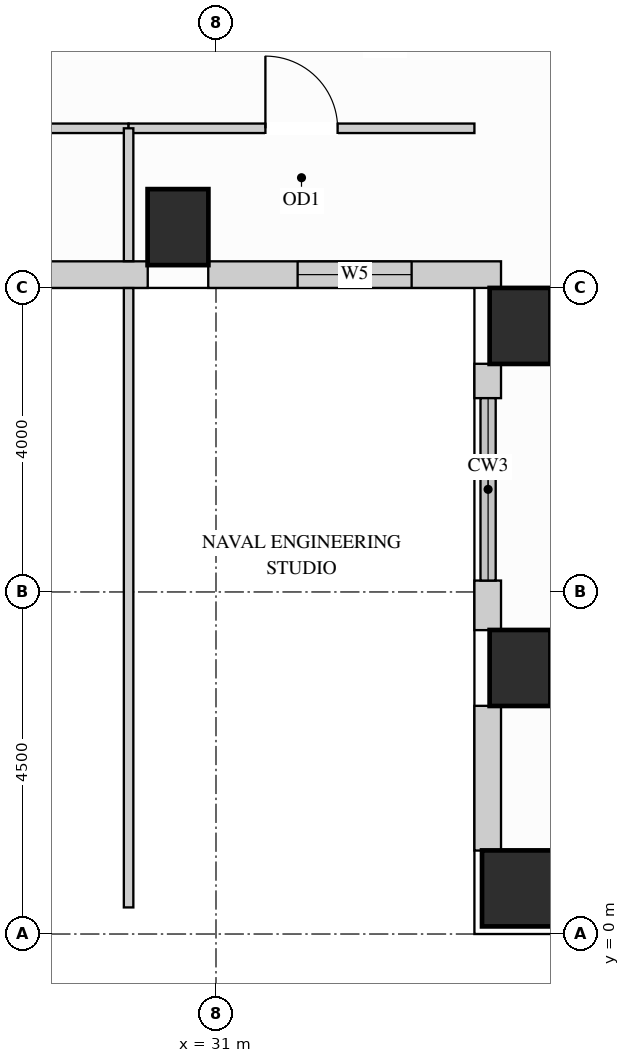
"""IFC4 building model, lengths in metres.
Left out: names, types, materials, properties, quantities, classifications, styles, units other than length and angle.
Written with IfcOpenShell. Run it as: python <this file> out.ifc"""

import sys

from ifc_helpers import new_model, si_unit, direction, frame, frame_2d, origin, origin_2d, place, context, subcontext, project, spatial, rectangle, extrude, source, transform, mapped, element, fill, save


model = new_model("IFC4")
c1 = context("Model", 3, precision=1e-05, world=origin(), true_north=direction((0.0, 1.0)))
c2 = subcontext(c1, "Body", "Model", "MODEL_VIEW")
j1 = project(units=[si_unit("LENGTHUNIT", "METRE"), si_unit("PLANEANGLEUNIT", "RADIAN")], contexts=[c1])
p1 = place(None, origin())
s1 = spatial("IfcSite", under=j1, at=p1, CompositionType="ELEMENT")
p2 = place(p1, origin())
s2 = spatial("IfcBuilding", under=s1, at=p2, CompositionType="ELEMENT")
p3 = place(p2, frame((0.0, 0.0, 175.5)))
s3 = spatial("IfcBuildingStorey", under=s2, at=p3, CompositionType="ELEMENT", Elevation=175.5)
m1 = source(origin(), c2, "Body", "SweptSolid", [
    extrude(rectangle(XDim=0.8, YDim=1.0, at=origin_2d()), origin(), (0.0, 0.0, 1.0), 3.4),
])
for number, where, z_axis, x_axis in (
    (1, (35.0, 3.5, 0.0), (0.0, 0.0, 1.0), (1.0, 0.0, 0.0)),
    (2, (35.0, 8.0, 0.0), (0.0, 0.0, 1.0), (1.0, 0.0, 0.0)),
    (3, (30.5, 9.3, 0.0), (0.0, 0.0, 1.0), (1.0, 0.0, 0.0)),
):
    element("IfcColumn", number, at=place(p3, frame(where, z_axis=z_axis, x_axis=x_axis)), inside=s3, PredefinedType="COLUMN", context=c2, shape_type="MappedRepresentation", body=[
        mapped(m1, transform((0.0, 0.0, 0.0), x_axis=(1.0, 0.0, 0.0), y_axis=(0.0, 1.0, 0.0), z_axis=(0.0, 0.0, 1.0))),
    ])
m2 = source(origin(), c2, "Body", "SweptSolid", [
    extrude(rectangle(XDim=1.0, YDim=1.0, at=origin_2d()), origin(), (0.0, 0.0, 1.0), 3.4),
])
p4 = place(p3, frame((35.0, 0.6, 0.0), z_axis=(0.0, 0.0, 1.0), x_axis=(1.0, 0.0, 0.0)))
e4 = element("IfcColumn", 4, at=p4, inside=s3, PredefinedType="COLUMN", context=c2, shape_type="MappedRepresentation", body=[
    mapped(m2, transform((0.0, 0.0, 0.0), x_axis=(1.0, 0.0, 0.0), y_axis=(0.0, 1.0, 0.0), z_axis=(0.0, 0.0, 1.0))),
])
p5 = place(p3, frame((23.798, 8.675, 0.0), z_axis=(0.0, 0.0, 1.0), x_axis=(1.0, 0.0, 0.0)))
e5 = element("IfcWall", 5, at=p5, inside=s3, PredefinedType="SOLIDWALL", context=c2, shape_type="SweptSolid", body=[
    extrude(rectangle(XDim=6.304, YDim=0.35, at=frame_2d((3.152, 0.0))), origin(), (0.0, 0.0, 1.0), 3.385),
])
p6 = place(p5, frame((1.147, 0.0, 0.78)))
e6 = element("IfcOpeningElement", 6, at=p6, cuts=e5, PredefinedType="OPENING", context=c2, shape_type="SweptSolid", body=[
    extrude(rectangle(XDim=1.5, YDim=2.0, at=frame_2d((0.75, 1.0))), frame((0.0, 0.185, 0.0), z_axis=(0.0, -1.0, 0.0), x_axis=(1.0, 0.0, 0.0)), (0.0, 0.0, 1.0), 0.37),
])
p7 = place(p5, frame((3.475, 0.0, 0.78)))
e7 = element("IfcOpeningElement", 7, at=p7, cuts=e5, PredefinedType="OPENING", context=c2, shape_type="SweptSolid", body=[
    extrude(rectangle(XDim=1.5, YDim=2.0, at=frame_2d((0.75, 1.0))), frame((0.0, 0.185, 0.0), z_axis=(0.0, -1.0, 0.0), x_axis=(1.0, 0.0, 0.0)), (0.0, 0.0, 1.0), 0.37),
])
p8 = place(p3, frame((30.898, 8.675, 0.0), z_axis=(0.0, 0.0, 1.0), x_axis=(1.0, 0.0, 0.0)))
e8 = element("IfcWall", 8, at=p8, inside=s3, PredefinedType="SOLIDWALL", context=c2, shape_type="SweptSolid", body=[
    extrude(rectangle(XDim=3.852, YDim=0.35, at=frame_2d((1.926, 0.0))), origin(), (0.0, 0.0, 1.0), 3.385),
])
p9 = place(p8, frame((1.176, 0.0, 0.78)))
e9 = element("IfcOpeningElement", 9, at=p9, cuts=e8, PredefinedType="OPENING", context=c2, shape_type="SweptSolid", body=[
    extrude(rectangle(XDim=1.5, YDim=2.0, at=frame_2d((0.75, 1.0))), frame((0.0, 0.185, 0.0), z_axis=(0.0, -1.0, 0.0), x_axis=(1.0, 0.0, 0.0)), (0.0, 0.0, 1.0), 0.37),
])
m3 = source(origin(), c2, "Body", "SweptSolid", [
    extrude(rectangle(XDim=0.452, YDim=0.35, at=frame_2d((0.226, 0.0))), origin(), (0.0, 0.0, 1.0), 2.612),
])
p10 = place(p3, frame((34.575, 7.502, 0.0), z_axis=(0.0, 0.0, 1.0), x_axis=(0.0, -1.0, 0.0)))
e10 = element("IfcWall", 10, at=p10, inside=s3, PredefinedType="SOLIDWALL", context=c2, shape_type="MappedRepresentation", body=[
    mapped(m3, transform((0.0, 0.0, 0.0), x_axis=(1.0, 0.0, 0.0), y_axis=(0.0, 1.0, 0.0), z_axis=(0.0, 0.0, 1.0))),
])
m4 = source(origin(), c2, "Body", "SweptSolid", [
    extrude(rectangle(XDim=0.652, YDim=0.35, at=frame_2d((0.326, 0.0))), origin(), (0.0, 0.0, 1.0), 2.612),
])
p11 = place(p3, frame((34.575, 4.65, 0.0), z_axis=(0.0, 0.0, 1.0), x_axis=(0.0, -1.0, 0.0)))
e11 = element("IfcWall", 11, at=p11, inside=s3, PredefinedType="SOLIDWALL", context=c2, shape_type="MappedRepresentation", body=[
    mapped(m4, transform((0.0, 0.0, 0.0), x_axis=(1.0, 0.0, 0.0), y_axis=(0.0, 1.0, 0.0), z_axis=(0.0, 0.0, 1.0))),
])
m5 = source(origin(), c2, "Body", "SweptSolid", [
    extrude(rectangle(XDim=1.904, YDim=0.35, at=frame_2d((0.952, 0.0))), origin(), (0.0, 0.0, 1.0), 2.612),
])
p12 = place(p3, frame((34.575, 3.002, 0.0), z_axis=(0.0, 0.0, 1.0), x_axis=(0.0, -1.0, 0.0)))
e12 = element("IfcWall", 12, at=p12, inside=s3, PredefinedType="SOLIDWALL", context=c2, shape_type="MappedRepresentation", body=[
    mapped(m5, transform((0.0, 0.0, 0.0), x_axis=(1.0, 0.0, 0.0), y_axis=(0.0, 1.0, 0.0), z_axis=(0.0, 0.0, 1.0))),
])
p13 = place(p3, frame((23.85, 10.6, 0.0), z_axis=(0.0, 0.0, 1.0), x_axis=(1.0, 0.0, 0.0)))
e13 = element("IfcWall", 13, at=p13, inside=s3, PredefinedType="PARTITIONING", context=c2, shape_type="SweptSolid", body=[
    extrude(rectangle(XDim=6.0, YDim=0.125, at=frame_2d((3.0, 0.0))), origin(), (0.0, 0.0, 1.0), 3.385),
])
p14 = place(p13, frame((2.525, 0.0, 0.0)))
e14 = element("IfcOpeningElement", 14, at=p14, cuts=e13, PredefinedType="OPENING", context=c2, shape_type="SweptSolid", body=[
    extrude(rectangle(XDim=0.95, YDim=2.15, at=frame_2d((0.475, 1.075))), frame((0.0, 0.073, 0.0), z_axis=(0.0, -1.0, 0.0), x_axis=(1.0, 0.0, 0.0)), (0.0, 0.0, 1.0), 0.145),
])
p15 = place(p3, frame((29.85, 10.6, 0.0), z_axis=(0.0, 0.0, 1.0), x_axis=(1.0, 0.0, 0.0)))
e15 = element("IfcWall", 15, at=p15, inside=s3, PredefinedType="PARTITIONING", context=c2, shape_type="SweptSolid", body=[
    extrude(rectangle(XDim=4.55, YDim=0.125, at=frame_2d((2.275, 0.0))), origin(), (0.0, 0.0, 1.0), 3.385),
])
p16 = place(p15, frame((1.8, 0.0, 0.0)))
e16 = element("IfcOpeningElement", 16, at=p16, cuts=e15, PredefinedType="OPENING", context=c2, shape_type="SweptSolid", body=[
    extrude(rectangle(XDim=0.95, YDim=2.15, at=frame_2d((0.475, 1.075))), frame((0.0, 0.073, 0.0), z_axis=(0.0, -1.0, 0.0), x_axis=(1.0, 0.0, 0.0)), (0.0, 0.0, 1.0), 0.145),
])
m6 = source(origin(), c2, "Body", "SweptSolid", [
    extrude(rectangle(XDim=8.148, YDim=0.125, at=frame_2d((4.074, 0.0))), origin(), (0.0, 0.0, 1.0), 3.385),
])
p17 = place(p3, frame((29.85, 0.35, 0.0), z_axis=(0.0, 0.0, 1.0), x_axis=(0.0, 1.0, 0.0)))
e17 = element("IfcWall", 17, at=p17, inside=s3, PredefinedType="PARTITIONING", context=c2, shape_type="MappedRepresentation", body=[
    mapped(m6, transform((0.0, 0.0, 0.0), x_axis=(1.0, 0.0, 0.0), y_axis=(0.0, 1.0, 0.0), z_axis=(0.0, 0.0, 1.0))),
])
m7 = source(origin(), c2, "Body", "SweptSolid", [
    extrude(rectangle(XDim=1.748, YDim=0.125, at=frame_2d((0.874, 0.0))), origin(), (0.0, 0.0, 1.0), 3.385),
])
p18 = place(p3, frame((29.85, 8.852, 0.0), z_axis=(0.0, 0.0, 1.0), x_axis=(0.0, 1.0, 0.0)))
e18 = element("IfcWall", 18, at=p18, inside=s3, PredefinedType="PARTITIONING", context=c2, shape_type="MappedRepresentation", body=[
    mapped(m7, transform((0.0, 0.0, 0.0), x_axis=(1.0, 0.0, 0.0), y_axis=(0.0, 1.0, 0.0), z_axis=(0.0, 0.0, 1.0))),
])
m8 = source(origin(), c2, "Body", "SweptSolid", [
    extrude(rectangle(XDim=0.95, YDim=2.15, at=frame_2d((0.475, 1.075))), frame((0.0, 0.025, 0.0), z_axis=(0.0, -1.0, 0.0), x_axis=(1.0, 0.0, 0.0)), (0.0, 0.0, 1.0), 0.05),
])
p19 = place(p16, origin())
e19 = element("IfcDoor", 19, at=p19, inside=s3, OperationType="SINGLE_SWING_LEFT", PredefinedType="DOOR", context=c2, shape_type="MappedRepresentation", body=[
    mapped(m8, transform((0.0, 0.0, 0.0), x_axis=(1.0, 0.0, 0.0), y_axis=(0.0, 1.0, 0.0), z_axis=(0.0, 0.0, 1.0))),
])
fill(e16, e19)
m9 = source(origin(), c2, "Body", "SweptSolid", [
    extrude(rectangle(XDim=1.5, YDim=2.0, at=frame_2d((0.75, 1.0))), frame((0.0, 0.03, 0.0), z_axis=(0.0, -1.0, 0.0), x_axis=(1.0, 0.0, 0.0)), (0.0, 0.0, 1.0), 0.06),
])
p20 = place(p9, origin())
e20 = element("IfcWindow", 20, at=p20, inside=s3, PartitioningType="SINGLE_PANEL", PredefinedType="WINDOW", context=c2, shape_type="MappedRepresentation", body=[
    mapped(m9, transform((0.0, 0.0, 0.0), x_axis=(1.0, 0.0, 0.0), y_axis=(0.0, 1.0, 0.0), z_axis=(0.0, 0.0, 1.0))),
])
fill(e9, e20)
save(model, sys.argv[1])
